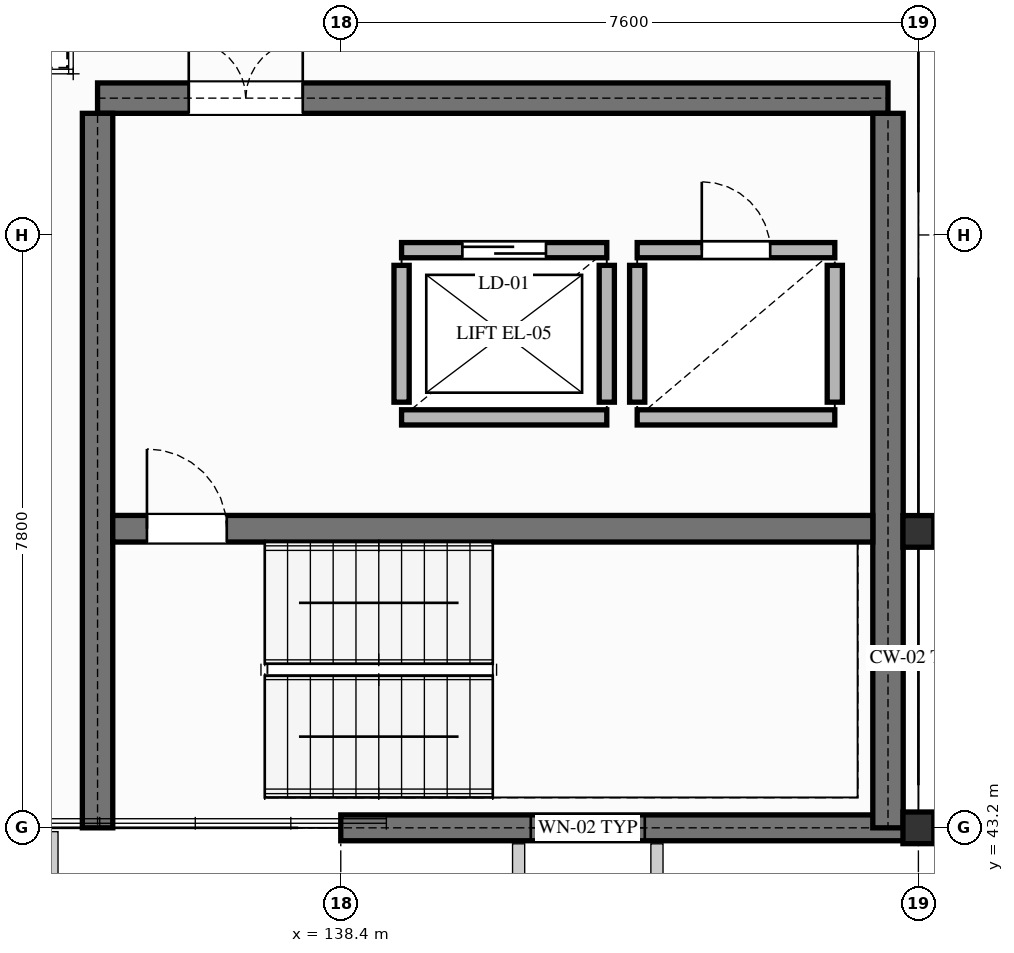
"""IFC4 building model, lengths in metres.
Left out: names, types, materials, properties, quantities, classifications, styles, units other than length and angle.
Written with IfcOpenShell. Run it as: python <this file> out.ifc"""

import sys

from ifc_helpers import new_model, si_unit, direction, frame, frame_2d, origin, origin_2d, place, context, subcontext, project, spatial, rectangle, i_section, extrude, element, fill, save


model = new_model("IFC4")
c1 = context("Model", 3, precision=1e-05, world=origin(), true_north=direction((0.0, 1.0)))
c2 = subcontext(c1, "Body", "Model", "MODEL_VIEW")
j1 = project(units=[si_unit("LENGTHUNIT", "METRE"), si_unit("PLANEANGLEUNIT", "RADIAN")], contexts=[c1])
p1 = place(None, origin())
s1 = spatial("IfcSite", under=j1, at=p1, CompositionType="ELEMENT")
p2 = place(p1, origin())
s2 = spatial("IfcBuilding", under=s1, at=p2, CompositionType="ELEMENT")
p3 = place(p2, frame((0.0, 0.0, 8.94)))
s3 = spatial("IfcBuildingStorey", under=s2, at=p3, CompositionType="ELEMENT", Elevation=8.94)
for number, where, z_axis, x_axis in (
    (1, (146.0, 47.1, 0.0), (0.0, 0.0, 1.0), (1.0, 0.0, 0.0)),
    (2, (146.0, 43.2, 0.0), (0.0, 0.0, 1.0), (1.0, 0.0, 0.0)),
):
    element("IfcColumn", number, at=place(p3, frame(where, z_axis=z_axis, x_axis=x_axis)), inside=s3, PredefinedType="COLUMN", context=c2, shape_type="SweptSolid", body=[
        extrude(i_section(OverallWidth=0.406, OverallDepth=0.417, WebThickness=0.03, FlangeThickness=0.048, at=origin_2d()), origin(), (0.0, 0.0, 1.0), 3.84),
    ])
p4 = place(p3, frame((138.4, 43.2, 0.0), z_axis=(0.0, 0.0, 1.0), x_axis=(1.0, 0.0, 0.0)))
e3 = element("IfcWall", 3, at=p4, inside=s3, PredefinedType="SOLIDWALL", context=c2, shape_type="SweptSolid", body=[
    extrude(rectangle(XDim=7.6, YDim=0.34, at=frame_2d((3.8, 0.0))), origin(), (0.0, 0.0, 1.0), 3.53),
])
p5 = place(p4, frame((2.5, 0.0, 0.9)))
e4 = element("IfcOpeningElement", 4, at=p5, cuts=e3, PredefinedType="OPENING", context=c2, shape_type="SweptSolid", body=[
    extrude(rectangle(XDim=1.5, YDim=2.1, at=frame_2d((0.75, 1.05))), frame((0.0, 0.18, 0.0), z_axis=(0.0, -1.0, 0.0), x_axis=(1.0, 0.0, 0.0)), (0.0, 0.0, 1.0), 0.36),
])
p6 = place(p3, frame((135.2, 52.8, 0.0), z_axis=(0.0, 0.0, 1.0), x_axis=(1.0, 0.0, 0.0)))
e5 = element("IfcWall", 5, at=p6, inside=s3, PredefinedType="SHEAR", context=c2, shape_type="SweptSolid", body=[
    extrude(rectangle(XDim=10.4, YDim=0.4, at=frame_2d((5.2, 0.0))), origin(), (0.0, 0.0, 1.0), 3.53),
])
p7 = place(p6, frame((1.2, 0.0, 0.0)))
e6 = element("IfcOpeningElement", 6, at=p7, cuts=e5, PredefinedType="OPENING", context=c2, shape_type="SweptSolid", body=[
    extrude(rectangle(XDim=1.5, YDim=2.2, at=frame_2d((0.75, 1.1))), frame((0.0, 0.21, 0.0), z_axis=(0.0, -1.0, 0.0), x_axis=(1.0, 0.0, 0.0)), (0.0, 0.0, 1.0), 0.42),
])
for number, where, z_axis, x_axis in (
    (7, (135.2, 43.2, 0.0), (0.0, 0.0, 1.0), (0.0, 1.0, 0.0)),
    (8, (145.6, 43.2, 0.0), (0.0, 0.0, 1.0), (0.0, 1.0, 0.0)),
):
    element("IfcWall", number, at=place(p3, frame(where, z_axis=z_axis, x_axis=x_axis)), inside=s3, PredefinedType="SHEAR", context=c2, shape_type="SweptSolid", body=[
        extrude(rectangle(XDim=9.4, YDim=0.4, at=frame_2d((4.7, 0.0))), origin(), (0.0, 0.0, 1.0), 3.53),
    ])
p8 = place(p3, frame((135.4, 47.135, 0.0), z_axis=(0.0, 0.0, 1.0), x_axis=(1.0, 0.0, 0.0)))
e9 = element("IfcWall", 9, at=p8, inside=s3, PredefinedType="SHEAR", context=c2, shape_type="SweptSolid", body=[
    extrude(rectangle(XDim=10.0, YDim=0.35, at=frame_2d((5.0, 0.0))), origin(), (0.0, 0.0, 1.0), 3.53),
])
p9 = place(p8, frame((0.45, 0.0, 0.0)))
e10 = element("IfcOpeningElement", 10, at=p9, cuts=e9, PredefinedType="OPENING", context=c2, shape_type="SweptSolid", body=[
    extrude(rectangle(XDim=1.05, YDim=2.2, at=frame_2d((0.525, 1.1))), frame((0.0, 0.185, 0.0), z_axis=(0.0, -1.0, 0.0), x_axis=(1.0, 0.0, 0.0)), (0.0, 0.0, 1.0), 0.37),
])
p10 = place(p3, frame((139.2, 48.6, 0.0), z_axis=(0.0, 0.0, 1.0), x_axis=(1.0, 0.0, 0.0)))
e11 = element("IfcWall", 11, at=p10, inside=s3, PredefinedType="PARTITIONING", context=c2, shape_type="SweptSolid", body=[
    extrude(rectangle(XDim=2.7, YDim=0.2, at=frame_2d((1.35, 0.0))), origin(), (0.0, 0.0, 1.0), 3.53),
])
p11 = place(p3, frame((139.2, 50.8, 0.0), z_axis=(0.0, 0.0, 1.0), x_axis=(1.0, 0.0, 0.0)))
e12 = element("IfcWall", 12, at=p11, inside=s3, PredefinedType="PARTITIONING", context=c2, shape_type="SweptSolid", body=[
    extrude(rectangle(XDim=2.7, YDim=0.2, at=frame_2d((1.35, 0.0))), origin(), (0.0, 0.0, 1.0), 3.53),
])
p12 = place(p11, frame((0.8, 0.0, 0.0)))
e13 = element("IfcOpeningElement", 13, at=p12, cuts=e12, PredefinedType="OPENING", context=c2, shape_type="SweptSolid", body=[
    extrude(rectangle(XDim=1.1, YDim=2.15, at=frame_2d((0.55, 1.075))), frame((0.0, 0.11, 0.0), z_axis=(0.0, -1.0, 0.0), x_axis=(1.0, 0.0, 0.0)), (0.0, 0.0, 1.0), 0.22),
])
for number, where, z_axis, x_axis in (
    (14, (139.2, 48.8, 0.0), (0.0, 0.0, 1.0), (0.0, 1.0, 0.0)),
    (15, (141.9, 48.8, 0.0), (0.0, 0.0, 1.0), (0.0, 1.0, 0.0)),
):
    element("IfcWall", number, at=place(p3, frame(where, z_axis=z_axis, x_axis=x_axis)), inside=s3, PredefinedType="PARTITIONING", context=c2, shape_type="SweptSolid", body=[
        extrude(rectangle(XDim=1.8, YDim=0.2, at=frame_2d((0.9, 0.0))), origin(), (0.0, 0.0, 1.0), 3.53),
    ])
p13 = place(p3, frame((142.3, 48.6, 0.0), z_axis=(0.0, 0.0, 1.0), x_axis=(1.0, 0.0, 0.0)))
e16 = element("IfcWall", 16, at=p13, inside=s3, PredefinedType="PARTITIONING", context=c2, shape_type="SweptSolid", body=[
    extrude(rectangle(XDim=2.6, YDim=0.2, at=frame_2d((1.3, 0.0))), origin(), (0.0, 0.0, 1.0), 3.53),
])
p14 = place(p3, frame((142.3, 50.8, 0.0), z_axis=(0.0, 0.0, 1.0), x_axis=(1.0, 0.0, 0.0)))
e17 = element("IfcWall", 17, at=p14, inside=s3, PredefinedType="PARTITIONING", context=c2, shape_type="SweptSolid", body=[
    extrude(rectangle(XDim=2.6, YDim=0.2, at=frame_2d((1.3, 0.0))), origin(), (0.0, 0.0, 1.0), 3.53),
])
p15 = place(p14, frame((0.85, 0.0, 0.0)))
e18 = element("IfcOpeningElement", 18, at=p15, cuts=e17, PredefinedType="OPENING", context=c2, shape_type="SweptSolid", body=[
    extrude(rectangle(XDim=0.9, YDim=2.1, at=frame_2d((0.45, 1.05))), frame((0.0, 0.11, 0.0), z_axis=(0.0, -1.0, 0.0), x_axis=(1.0, 0.0, 0.0)), (0.0, 0.0, 1.0), 0.22),
])
for number, where, z_axis, x_axis in (
    (19, (142.3, 48.8, 0.0), (0.0, 0.0, 1.0), (0.0, 1.0, 0.0)),
    (20, (144.9, 48.8, 0.0), (0.0, 0.0, 1.0), (0.0, 1.0, 0.0)),
):
    element("IfcWall", number, at=place(p3, frame(where, z_axis=z_axis, x_axis=x_axis)), inside=s3, PredefinedType="PARTITIONING", context=c2, shape_type="SweptSolid", body=[
        extrude(rectangle(XDim=1.8, YDim=0.2, at=frame_2d((0.9, 0.0))), origin(), (0.0, 0.0, 1.0), 3.53),
    ])
p16 = place(p5, origin())
e21 = element("IfcWindow", 21, at=p16, inside=s3, PartitioningType="SINGLE_PANEL", PredefinedType="WINDOW", context=c2, shape_type="SweptSolid", body=[
    extrude(rectangle(XDim=1.5, YDim=2.1, at=frame_2d((0.75, 1.05))), frame((0.0, 0.03, 0.0), z_axis=(0.0, -1.0, 0.0), x_axis=(1.0, 0.0, 0.0)), (0.0, 0.0, 1.0), 0.06),
])
fill(e4, e21)
p17 = place(p7, origin())
e22 = element("IfcDoor", 22, at=p17, inside=s3, OperationType="DOUBLE_DOOR_SINGLE_SWING", PredefinedType="DOOR", context=c2, shape_type="SweptSolid", body=[
    extrude(rectangle(XDim=1.5, YDim=2.2, at=frame_2d((0.75, 1.1))), frame((0.0, 0.025, 0.0), z_axis=(0.0, -1.0, 0.0), x_axis=(1.0, 0.0, 0.0)), (0.0, 0.0, 1.0), 0.05),
])
fill(e6, e22)
p18 = place(p9, origin())
e23 = element("IfcDoor", 23, at=p18, inside=s3, OperationType="SINGLE_SWING_LEFT", PredefinedType="DOOR", context=c2, shape_type="SweptSolid", body=[
    extrude(rectangle(XDim=1.05, YDim=2.2, at=frame_2d((0.525, 1.1))), frame((0.0, 0.025, 0.0), z_axis=(0.0, -1.0, 0.0), x_axis=(1.0, 0.0, 0.0)), (0.0, 0.0, 1.0), 0.05),
])
fill(e10, e23)
p19 = place(p12, origin())
e24 = element("IfcDoor", 24, at=p19, inside=s3, OperationType="SLIDING_TO_LEFT", PredefinedType="DOOR", context=c2, shape_type="SweptSolid", body=[
    extrude(rectangle(XDim=1.1, YDim=2.15, at=frame_2d((0.55, 1.075))), frame((0.0, 0.025, 0.0), z_axis=(0.0, -1.0, 0.0), x_axis=(1.0, 0.0, 0.0)), (0.0, 0.0, 1.0), 0.05),
])
fill(e13, e24)
p20 = place(p15, origin())
e25 = element("IfcDoor", 25, at=p20, inside=s3, OperationType="SINGLE_SWING_LEFT", PredefinedType="DOOR", context=c2, shape_type="SweptSolid", body=[
    extrude(rectangle(XDim=0.9, YDim=2.1, at=frame_2d((0.45, 1.05))), frame((0.0, 0.025, 0.0), z_axis=(0.0, -1.0, 0.0), x_axis=(1.0, 0.0, 0.0)), (0.0, 0.0, 1.0), 0.05),
])
fill(e18, e25)
save(model, sys.argv[1])
